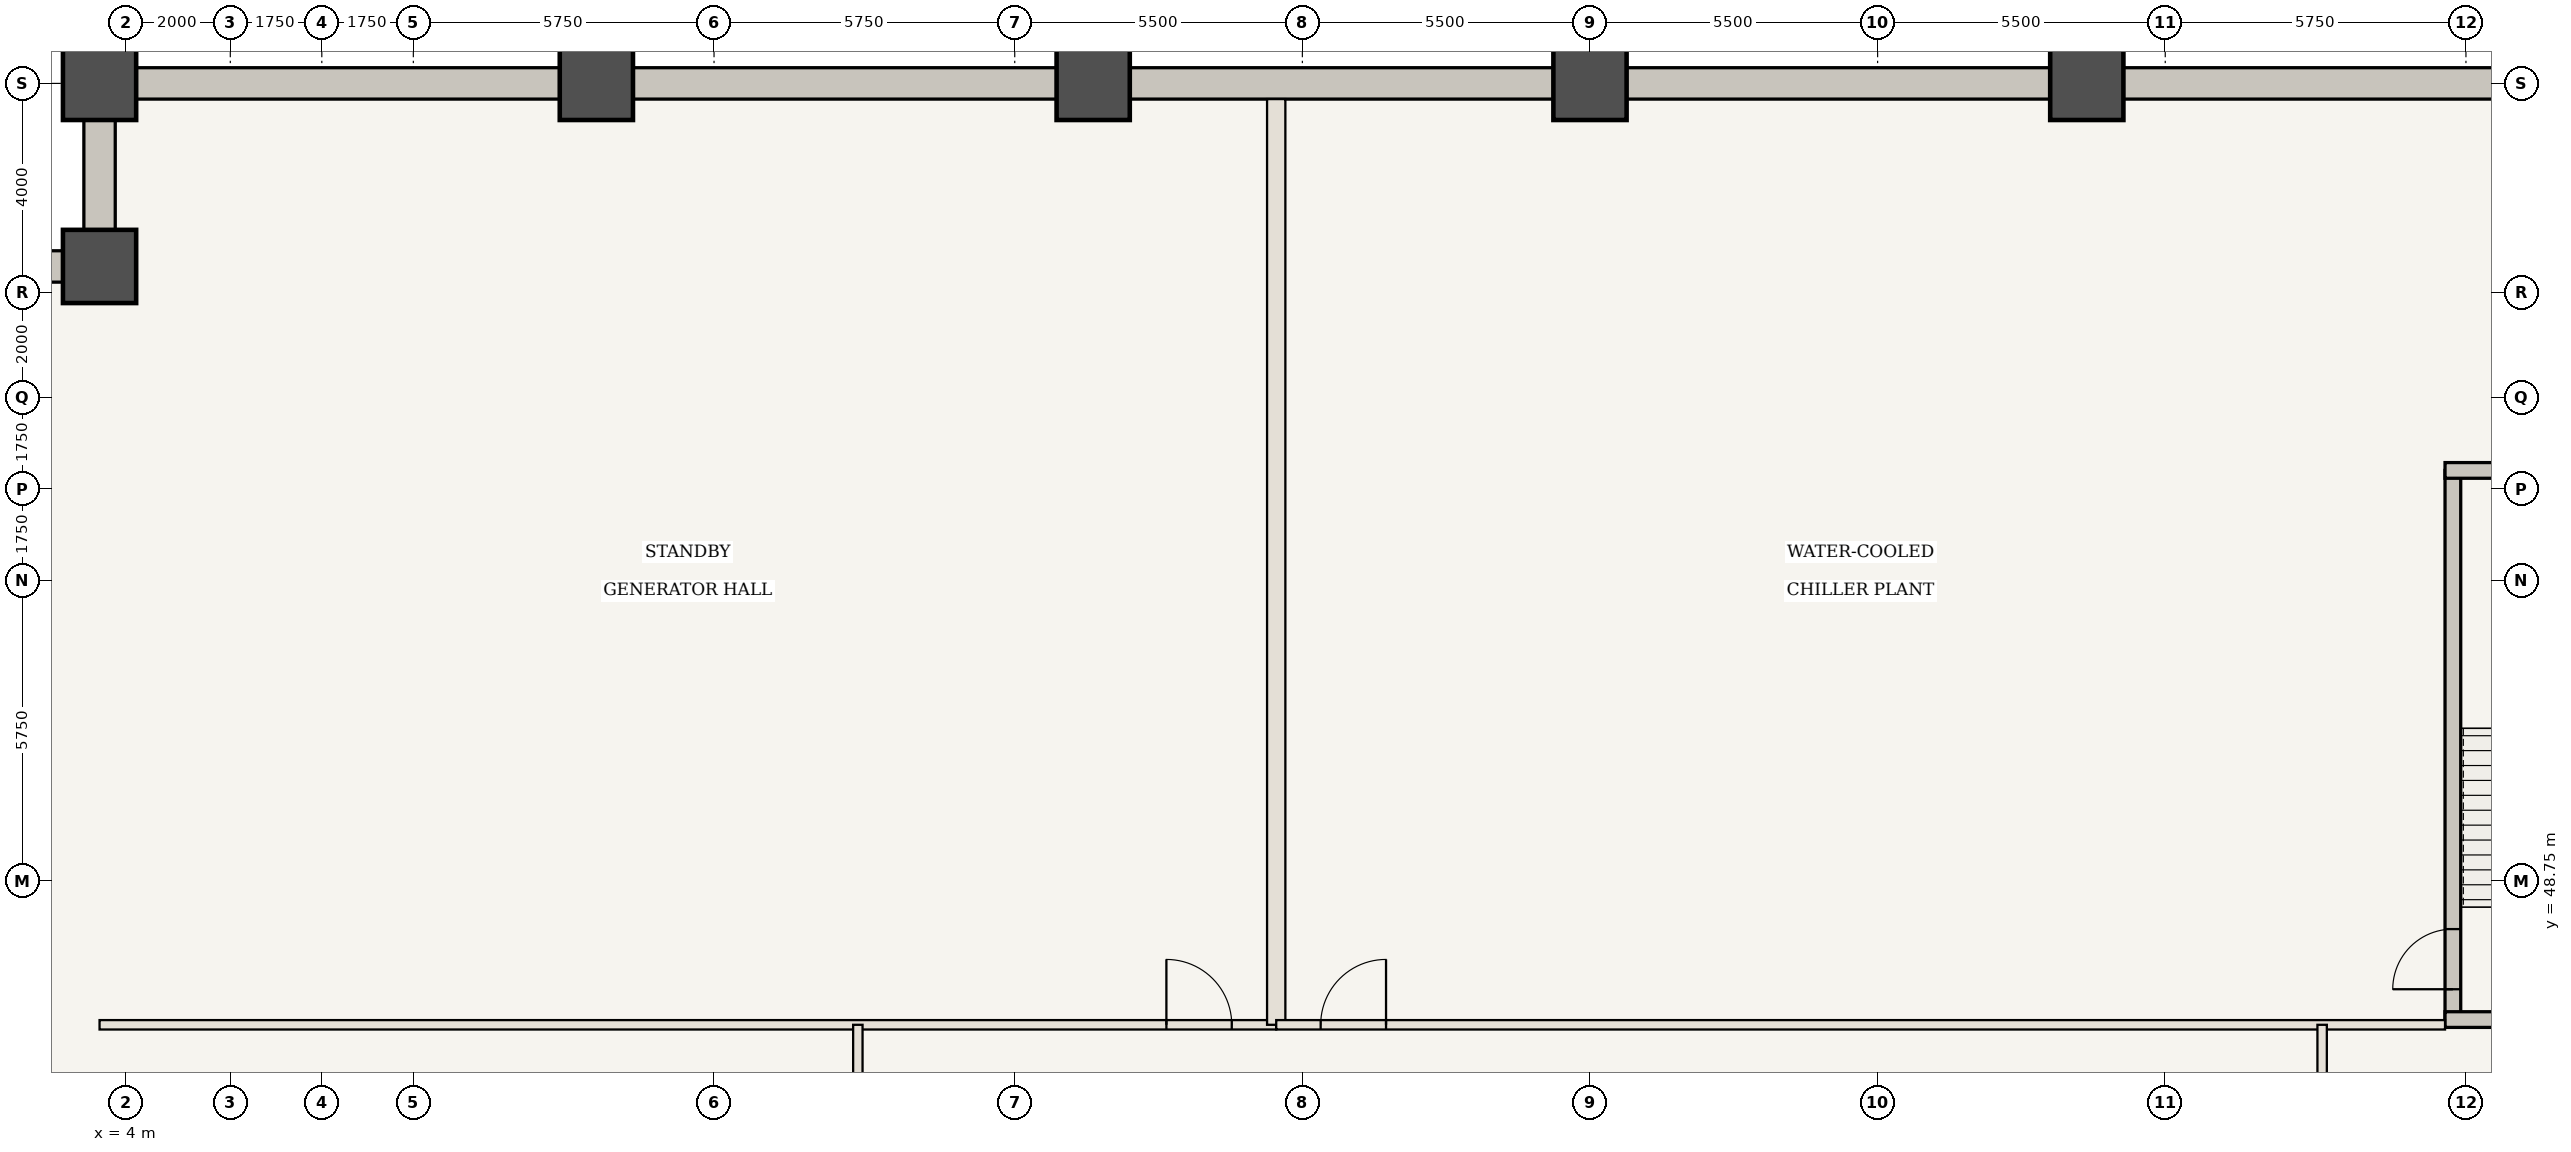
"""IFC4 building model, lengths in metres.
Left out: names, types, materials, properties, quantities, classifications, styles, units other than length and angle.
Written with IfcOpenShell. Run it as: python <this file> out.ifc"""

import sys

from ifc_helpers import new_model, si_unit, direction, frame, frame_2d, origin, origin_2d, place, context, subcontext, project, spatial, rectangle, extrude, element, fill, save


model = new_model("IFC4")
c1 = context("Model", 3, precision=1e-05, world=origin(), true_north=direction((0.0, 1.0)))
c2 = subcontext(c1, "Body", "Model", "MODEL_VIEW")
j1 = project(units=[si_unit("LENGTHUNIT", "METRE"), si_unit("PLANEANGLEUNIT", "RADIAN")], contexts=[c1])
p1 = place(None, origin())
s1 = spatial("IfcSite", under=j1, at=p1, CompositionType="ELEMENT")
p2 = place(p1, origin())
s2 = spatial("IfcBuilding", under=s1, at=p2, CompositionType="ELEMENT")
p3 = place(p2, frame((0.0, 0.0, -9.1)))
s3 = spatial("IfcBuildingStorey", under=s2, at=p3, CompositionType="ELEMENT", Elevation=-9.1)
p4 = place(p3, frame((60.5, 64.0, -0.6), z_axis=(0.0, 0.0, 1.0), x_axis=(-1.0, 0.0, 0.0)))
e1 = element("IfcWall", 1, at=p4, inside=s3, PredefinedType="USERDEFINED", context=c2, shape_type="SweptSolid", body=[
    extrude(rectangle(XDim=57.0, YDim=0.6, at=frame_2d((28.5, 0.0))), origin(), (0.0, 0.0, 1.0), 5.15),
])
for number, where, z_axis, x_axis in (
    (2, (3.5, 64.0, -0.6), (0.0, 0.0, 1.0), (0.0, -1.0, 0.0)),
    (3, (3.5, 60.5, -0.6), (0.0, 0.0, 1.0), (-1.0, 0.0, 0.0)),
):
    element("IfcWall", number, at=place(p3, frame(where, z_axis=z_axis, x_axis=x_axis)), inside=s3, PredefinedType="USERDEFINED", context=c2, shape_type="SweptSolid", body=[
        extrude(rectangle(XDim=3.5, YDim=0.6, at=frame_2d((1.75, 0.0))), origin(), (0.0, 0.0, 1.0), 5.15),
    ])
for number, where, z_axis, x_axis in (
    (4, (3.5, 64.0, -0.6), (0.0, 0.0, 1.0), (1.0, 0.0, 0.0)),
    (5, (3.5, 60.5, -0.6), (0.0, 0.0, 1.0), (1.0, 0.0, 0.0)),
    (6, (13.0, 64.0, -0.6), (0.0, 0.0, 1.0), (1.0, 0.0, 0.0)),
    (7, (22.5, 64.0, -0.6), (0.0, 0.0, 1.0), (1.0, 0.0, 0.0)),
    (8, (32.0, 64.0, -0.6), (0.0, 0.0, 1.0), (1.0, 0.0, 0.0)),
    (9, (41.5, 64.0, -0.6), (0.0, 0.0, 1.0), (1.0, 0.0, 0.0)),
):
    element("IfcColumn", number, at=place(p3, frame(where, z_axis=z_axis, x_axis=x_axis)), inside=s3, PredefinedType="COLUMN", context=c2, shape_type="SweptSolid", body=[
        extrude(rectangle(XDim=1.4, YDim=1.4, at=origin_2d()), origin(), (0.0, 0.0, 1.0), 5.15),
    ])
p5 = place(p3, frame((48.5, 46.1, 0.0), z_axis=(0.0, 0.0, 1.0), x_axis=(0.0, 1.0, 0.0)))
e10 = element("IfcWall", 10, at=p5, inside=s3, PredefinedType="SHEAR", context=c2, shape_type="SweptSolid", body=[
    extrude(rectangle(XDim=10.5, YDim=0.3, at=frame_2d((5.25, 0.0))), origin(), (0.0, 0.0, 1.0), 4.25),
])
p6 = place(p5, frame((0.58, 0.0, 0.0)))
e11 = element("IfcOpeningElement", 11, at=p6, cuts=e10, PredefinedType="OPENING", context=c2, shape_type="SweptSolid", body=[
    extrude(rectangle(XDim=1.15, YDim=2.15, at=frame_2d((0.575, 1.075))), frame((0.0, 0.16, 0.0), z_axis=(0.0, -1.0, 0.0), x_axis=(1.0, 0.0, 0.0)), (0.0, 0.0, 1.0), 0.32),
])
for number, where, z_axis, x_axis in (
    (12, (48.35, 46.1, 0.0), (0.0, 0.0, 1.0), (1.0, 0.0, 0.0)),
    (13, (48.35, 56.6, 0.0), (0.0, 0.0, 1.0), (1.0, 0.0, 0.0)),
):
    element("IfcWall", number, at=place(p3, frame(where, z_axis=z_axis, x_axis=x_axis)), inside=s3, PredefinedType="SHEAR", context=c2, shape_type="SweptSolid", body=[
        extrude(rectangle(XDim=4.75, YDim=0.3, at=frame_2d((2.375, 0.0))), origin(), (0.0, 0.0, 1.0), 4.25),
    ])
p7 = place(p3, frame((3.5, 46.0, 0.0), z_axis=(0.0, 0.0, 1.0), x_axis=(1.0, 0.0, 0.0)))
e14 = element("IfcWall", 14, at=p7, inside=s3, PredefinedType="STANDARD", context=c2, shape_type="SweptSolid", body=[
    extrude(rectangle(XDim=22.5, YDim=0.18, at=frame_2d((11.25, 0.0))), origin(), (0.0, 0.0, 1.0), 4.25),
])
p8 = place(p7, frame((20.4, 0.0, 0.0)))
e15 = element("IfcOpeningElement", 15, at=p8, cuts=e14, PredefinedType="OPENING", context=c2, shape_type="SweptSolid", body=[
    extrude(rectangle(XDim=1.25, YDim=2.2, at=frame_2d((0.625, 1.1))), frame((0.0, 0.1, 0.0), z_axis=(0.0, -1.0, 0.0), x_axis=(1.0, 0.0, 0.0)), (0.0, 0.0, 1.0), 0.2),
])
p9 = place(p3, frame((26.0, 46.0, 0.0), z_axis=(0.0, 0.0, 1.0), x_axis=(0.0, 1.0, 0.0)))
e16 = element("IfcWall", 16, at=p9, inside=s3, PredefinedType="STANDARD", context=c2, shape_type="SweptSolid", body=[
    extrude(rectangle(XDim=17.7, YDim=0.35, at=frame_2d((8.85, 0.0))), origin(), (0.0, 0.0, 1.0), 4.25),
])
p10 = place(p3, frame((26.0, 46.0, 0.0), z_axis=(0.0, 0.0, 1.0), x_axis=(1.0, 0.0, 0.0)))
e17 = element("IfcWall", 17, at=p10, inside=s3, PredefinedType="STANDARD", context=c2, shape_type="SweptSolid", body=[
    extrude(rectangle(XDim=22.35, YDim=0.18, at=frame_2d((11.175, 0.0))), origin(), (0.0, 0.0, 1.0), 4.25),
])
p11 = place(p10, frame((0.85, 0.0, 0.0)))
e18 = element("IfcOpeningElement", 18, at=p11, cuts=e17, PredefinedType="OPENING", context=c2, shape_type="SweptSolid", body=[
    extrude(rectangle(XDim=1.25, YDim=2.2, at=frame_2d((0.625, 1.1))), frame((0.0, 0.1, 0.0), z_axis=(0.0, -1.0, 0.0), x_axis=(1.0, 0.0, 0.0)), (0.0, 0.0, 1.0), 0.2),
])
p12 = place(p3, frame((18.0, 18.0, 0.0), z_axis=(0.0, 0.0, 1.0), x_axis=(0.0, 1.0, 0.0)))
e19 = element("IfcWall", 19, at=p12, inside=s3, PredefinedType="STANDARD", context=c2, shape_type="SweptSolid", body=[
    extrude(rectangle(XDim=28.0, YDim=0.18, at=frame_2d((14.0, 0.0))), origin(), (0.0, 0.0, 1.0), 4.25),
])
p13 = place(p12, frame((14.95, 0.0, 0.0)))
e20 = element("IfcOpeningElement", 20, at=p13, cuts=e19, PredefinedType="OPENING", context=c2, shape_type="SweptSolid", body=[
    extrude(rectangle(XDim=1.25, YDim=2.2, at=frame_2d((0.625, 1.1))), frame((0.0, 0.1, 0.0), z_axis=(0.0, -1.0, 0.0), x_axis=(1.0, 0.0, 0.0)), (0.0, 0.0, 1.0), 0.2),
])
p14 = place(p3, frame((46.0, 18.0, 0.0), z_axis=(0.0, 0.0, 1.0), x_axis=(0.0, 1.0, 0.0)))
e21 = element("IfcWall", 21, at=p14, inside=s3, PredefinedType="STANDARD", context=c2, shape_type="SweptSolid", body=[
    extrude(rectangle(XDim=28.0, YDim=0.18, at=frame_2d((14.0, 0.0))), origin(), (0.0, 0.0, 1.0), 4.25),
])
p15 = place(p14, frame((14.95, 0.0, 0.0)))
e22 = element("IfcOpeningElement", 22, at=p15, cuts=e21, PredefinedType="OPENING", context=c2, shape_type="SweptSolid", body=[
    extrude(rectangle(XDim=1.25, YDim=2.2, at=frame_2d((0.625, 1.1))), frame((0.0, 0.1, 0.0), z_axis=(0.0, -1.0, 0.0), x_axis=(1.0, 0.0, 0.0)), (0.0, 0.0, 1.0), 0.2),
])
p16 = place(p6, origin())
e23 = element("IfcDoor", 23, at=p16, inside=s3, OperationType="SINGLE_SWING_LEFT", PredefinedType="DOOR", context=c2, shape_type="SweptSolid", body=[
    extrude(rectangle(XDim=1.15, YDim=2.15, at=frame_2d((0.575, 1.075))), frame((0.0, 0.025, 0.0), z_axis=(0.0, -1.0, 0.0), x_axis=(1.0, 0.0, 0.0)), (0.0, 0.0, 1.0), 0.05),
])
fill(e11, e23)
p17 = place(p8, origin())
e24 = element("IfcDoor", 24, at=p17, inside=s3, OperationType="SINGLE_SWING_LEFT", PredefinedType="DOOR", context=c2, shape_type="SweptSolid", body=[
    extrude(rectangle(XDim=1.25, YDim=2.2, at=frame_2d((0.625, 1.1))), frame((0.0, 0.025, 0.0), z_axis=(0.0, -1.0, 0.0), x_axis=(1.0, 0.0, 0.0)), (0.0, 0.0, 1.0), 0.05),
])
fill(e15, e24)
p18 = place(p11, origin())
e25 = element("IfcDoor", 25, at=p18, inside=s3, OperationType="SINGLE_SWING_RIGHT", PredefinedType="DOOR", context=c2, shape_type="SweptSolid", body=[
    extrude(rectangle(XDim=1.25, YDim=2.2, at=frame_2d((0.625, 1.1))), frame((0.0, 0.025, 0.0), z_axis=(0.0, -1.0, 0.0), x_axis=(1.0, 0.0, 0.0)), (0.0, 0.0, 1.0), 0.05),
])
fill(e18, e25)
save(model, sys.argv[1])
